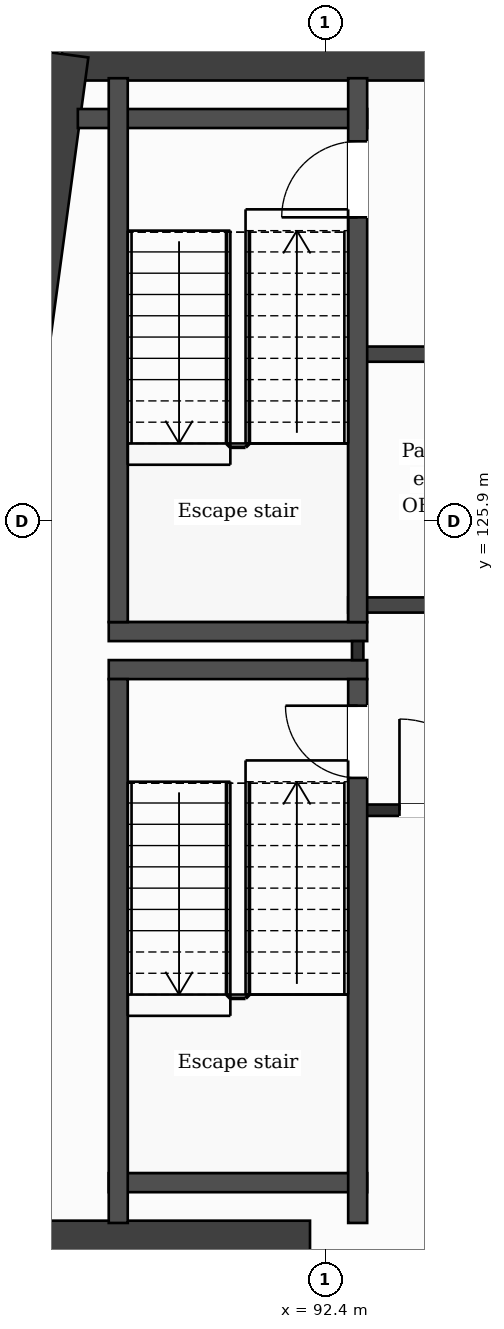
"""IFC4 building model, lengths in metres.
Left out: names, types, materials, properties, quantities, classifications, styles, units other than length and angle.
Written with IfcOpenShell. Run it as: python <this file> out.ifc"""

import sys

from ifc_helpers import new_model, si_unit, direction, frame, frame_2d, origin, place, context, subcontext, project, spatial, rectangle, extrude, element, fill, save


model = new_model("IFC4")
c1 = context("Model", 3, precision=1e-05, world=origin(), true_north=direction((0.0, 1.0)))
c2 = subcontext(c1, "Body", "Model", "MODEL_VIEW")
j1 = project(units=[si_unit("LENGTHUNIT", "METRE"), si_unit("PLANEANGLEUNIT", "RADIAN")], contexts=[c1])
p1 = place(None, origin())
s1 = spatial("IfcSite", under=j1, at=p1, CompositionType="ELEMENT")
p2 = place(p1, origin())
s2 = spatial("IfcBuilding", under=s1, at=p2, CompositionType="ELEMENT")
p3 = place(p2, frame((0.0, 0.0, 273.8)))
s3 = spatial("IfcBuildingStorey", under=s2, at=p3, CompositionType="ELEMENT", Elevation=273.8)
p4 = place(p3, frame((88.937, 132.05, 0.0), z_axis=(0.0, 0.0, 1.0), x_axis=(1.0, 0.0, 0.0)))
e1 = element("IfcWall", 1, at=p4, inside=s3, PredefinedType="SHEAR", context=c2, shape_type="SweptSolid", body=[
    extrude(rectangle(XDim=11.513, YDim=0.7, at=frame_2d((5.757, 0.0))), origin(), (0.0, 0.0, 1.0), 3.7),
])
p5 = place(p4, frame((6.927, 0.0, 0.0)))
e2 = element("IfcOpeningElement", 2, at=p5, cuts=e1, PredefinedType="OPENING", context=c2, shape_type="SweptSolid", body=[
    extrude(rectangle(XDim=1.2, YDim=2.1, at=frame_2d((0.6, 1.05))), frame((0.0, 0.36, 0.0), z_axis=(0.0, -1.0, 0.0), x_axis=(1.0, 0.0, 0.0)), (0.0, 0.0, 1.0), 0.72),
])
p6 = place(p3, frame((86.07, 110.75, 0.0), z_axis=(0.0, 0.0, 1.0), x_axis=(0.133406218907, 0.991061441464, 0.0)))
e3 = element("IfcWall", 3, at=p6, inside=s3, PredefinedType="SHEAR", context=c2, shape_type="SweptSolid", body=[
    extrude(rectangle(XDim=21.492, YDim=0.7, at=frame_2d((10.746, 0.0))), origin(), (0.0, 0.0, 1.0), 3.7),
])
p7 = place(p3, frame((87.123, 116.35, 0.0), z_axis=(0.0, 0.0, 1.0), x_axis=(1.0, 0.0, 0.0)))
e4 = element("IfcWall", 4, at=p7, inside=s3, PredefinedType="SHEAR", context=c2, shape_type="SweptSolid", body=[
    extrude(rectangle(XDim=5.077, YDim=0.7, at=frame_2d((2.539, 0.0))), origin(), (0.0, 0.0, 1.0), 3.7),
])
p8 = place(p3, frame((89.552, 117.2, 0.0), z_axis=(0.0, 0.0, 1.0), x_axis=(1.0, 0.0, 0.0)))
e5 = element("IfcWall", 5, at=p8, inside=s3, PredefinedType="PARTITIONING", context=c2, shape_type="SweptSolid", body=[
    extrude(rectangle(XDim=3.4, YDim=0.25, at=frame_2d((1.7, 0.0))), origin(), (0.0, 0.0, 1.0), 3.38),
])
p9 = place(p3, frame((92.827, 122.1, 0.0), z_axis=(0.0, 0.0, 1.0), x_axis=(1.0, 0.0, 0.0)))
e6 = element("IfcWall", 6, at=p9, inside=s3, PredefinedType="PARTITIONING", context=c2, shape_type="SweptSolid", body=[
    extrude(rectangle(XDim=2.4, YDim=0.15, at=frame_2d((1.2, 0.0))), origin(), (0.0, 0.0, 1.0), 3.38),
])
p10 = place(p9, frame((0.55, 0.0, 0.0)))
e7 = element("IfcOpeningElement", 7, at=p10, cuts=e6, PredefinedType="OPENING", context=c2, shape_type="SweptSolid", body=[
    extrude(rectangle(XDim=1.2, YDim=2.1, at=frame_2d((0.6, 1.05))), frame((0.0, 0.085, 0.0), z_axis=(0.0, -1.0, 0.0), x_axis=(1.0, 0.0, 0.0)), (0.0, 0.0, 1.0), 0.17),
])
for number, where, z_axis, x_axis in (
    (8, (89.552, 123.95, 0.0), (0.0, 0.0, 1.0), (1.0, 0.0, 0.0)),
    (9, (89.552, 124.45, 0.0), (0.0, 0.0, 1.0), (1.0, 0.0, 0.0)),
):
    element("IfcWall", number, at=place(p3, frame(where, z_axis=z_axis, x_axis=x_axis)), inside=s3, PredefinedType="PARTITIONING", context=c2, shape_type="SweptSolid", body=[
        extrude(rectangle(XDim=3.4, YDim=0.25, at=frame_2d((1.7, 0.0))), origin(), (0.0, 0.0, 1.0), 3.38),
    ])
p11 = place(p3, frame((92.702, 124.8, 0.0), z_axis=(0.0, 0.0, 1.0), x_axis=(1.0, 0.0, 0.0)))
e10 = element("IfcWall", 10, at=p11, inside=s3, PredefinedType="PARTITIONING", context=c2, shape_type="SweptSolid", body=[
    extrude(rectangle(XDim=7.398, YDim=0.2, at=frame_2d((3.699, 0.0))), origin(), (0.0, 0.0, 1.0), 3.38),
])
p12 = place(p11, frame((5.636, 0.0, 0.0)))
e11 = element("IfcOpeningElement", 11, at=p12, cuts=e10, PredefinedType="OPENING", context=c2, shape_type="SweptSolid", body=[
    extrude(rectangle(XDim=1.1, YDim=2.1, at=frame_2d((0.55, 1.05))), frame((0.0, 0.11, 0.0), z_axis=(0.0, -1.0, 0.0), x_axis=(1.0, 0.0, 0.0)), (0.0, 0.0, 1.0), 0.22),
])
p13 = place(p3, frame((92.827, 128.1, 0.0), z_axis=(0.0, 0.0, 1.0), x_axis=(1.0, 0.0, 0.0)))
e12 = element("IfcWall", 12, at=p13, inside=s3, PredefinedType="PARTITIONING", context=c2, shape_type="SweptSolid", body=[
    extrude(rectangle(XDim=7.273, YDim=0.2, at=frame_2d((3.637, 0.0))), origin(), (0.0, 0.0, 1.0), 3.38),
])
p14 = place(p13, frame((2.93, 0.0, 0.0)))
e13 = element("IfcOpeningElement", 13, at=p14, cuts=e12, PredefinedType="OPENING", context=c2, shape_type="SweptSolid", body=[
    extrude(rectangle(XDim=1.1, YDim=2.1, at=frame_2d((0.55, 1.05))), frame((0.0, 0.11, 0.0), z_axis=(0.0, -1.0, 0.0), x_axis=(1.0, 0.0, 0.0)), (0.0, 0.0, 1.0), 0.22),
])
p15 = place(p3, frame((89.146, 131.2, 0.0), z_axis=(0.0, 0.0, 1.0), x_axis=(1.0, 0.0, 0.0)))
e14 = element("IfcWall", 14, at=p15, inside=s3, PredefinedType="PARTITIONING", context=c2, shape_type="SweptSolid", body=[
    extrude(rectangle(XDim=3.806, YDim=0.25, at=frame_2d((1.903, 0.0))), origin(), (0.0, 0.0, 1.0), 3.38),
])
for number, where, z_axis, x_axis in (
    (15, (89.677, 116.67, 0.0), (0.0, 0.0, 1.0), (0.0, 1.0, 0.0)),
    (16, (89.677, 124.575, 0.0), (0.0, 0.0, 1.0), (0.0, 1.0, 0.0)),
):
    element("IfcWall", number, at=place(p3, frame(where, z_axis=z_axis, x_axis=x_axis)), inside=s3, PredefinedType="PARTITIONING", context=c2, shape_type="SweptSolid", body=[
        extrude(rectangle(XDim=7.155, YDim=0.25, at=frame_2d((3.578, 0.0))), origin(), (0.0, 0.0, 1.0), 3.38),
    ])
p16 = place(p3, frame((92.827, 124.075, 0.0), z_axis=(0.0, 0.0, 1.0), x_axis=(0.0, 1.0, 0.0)))
e17 = element("IfcWall", 17, at=p16, inside=s3, PredefinedType="PARTITIONING", context=c2, shape_type="SweptSolid", body=[
    extrude(rectangle(XDim=0.25, YDim=0.15, at=frame_2d((0.125, 0.0))), origin(), (0.0, 0.0, 1.0), 3.38),
])
p17 = place(p3, frame((92.827, 116.67, 0.0), z_axis=(0.0, 0.0, 1.0), x_axis=(0.0, 1.0, 0.0)))
e18 = element("IfcWall", 18, at=p17, inside=s3, PredefinedType="PARTITIONING", context=c2, shape_type="SweptSolid", body=[
    extrude(rectangle(XDim=7.155, YDim=0.25, at=frame_2d((3.578, 0.0))), origin(), (0.0, 0.0, 1.0), 3.38),
])
p18 = place(p17, frame((5.855, 0.0, 0.0)))
e19 = element("IfcOpeningElement", 19, at=p18, cuts=e18, PredefinedType="OPENING", context=c2, shape_type="SweptSolid", body=[
    extrude(rectangle(XDim=0.95, YDim=2.1, at=frame_2d((0.475, 1.05))), frame((0.0, 0.135, 0.0), z_axis=(0.0, -1.0, 0.0), x_axis=(1.0, 0.0, 0.0)), (0.0, 0.0, 1.0), 0.27),
])
p19 = place(p3, frame((92.827, 124.575, 0.0), z_axis=(0.0, 0.0, 1.0), x_axis=(0.0, 1.0, 0.0)))
e20 = element("IfcWall", 20, at=p19, inside=s3, PredefinedType="PARTITIONING", context=c2, shape_type="SweptSolid", body=[
    extrude(rectangle(XDim=7.155, YDim=0.25, at=frame_2d((3.578, 0.0))), origin(), (0.0, 0.0, 1.0), 3.38),
])
p20 = place(p19, frame((5.325, 0.0, 0.0)))
e21 = element("IfcOpeningElement", 21, at=p20, cuts=e20, PredefinedType="OPENING", context=c2, shape_type="SweptSolid", body=[
    extrude(rectangle(XDim=1.0, YDim=2.1, at=frame_2d((0.5, 1.05))), frame((0.0, 0.135, 0.0), z_axis=(0.0, -1.0, 0.0), x_axis=(1.0, 0.0, 0.0)), (0.0, 0.0, 1.0), 0.27),
])
p21 = place(p10, origin())
e22 = element("IfcDoor", 22, at=p21, inside=s3, OperationType="SINGLE_SWING_LEFT", PredefinedType="DOOR", context=c2, shape_type="SweptSolid", body=[
    extrude(rectangle(XDim=1.2, YDim=2.1, at=frame_2d((0.6, 1.05))), frame((0.0, 0.025, 0.0), z_axis=(0.0, -1.0, 0.0), x_axis=(1.0, 0.0, 0.0)), (0.0, 0.0, 1.0), 0.05),
])
fill(e7, e22)
p22 = place(p18, origin())
e23 = element("IfcDoor", 23, at=p22, inside=s3, OperationType="SINGLE_SWING_RIGHT", PredefinedType="DOOR", context=c2, shape_type="SweptSolid", body=[
    extrude(rectangle(XDim=0.95, YDim=2.1, at=frame_2d((0.475, 1.05))), frame((0.0, 0.025, 0.0), z_axis=(0.0, -1.0, 0.0), x_axis=(1.0, 0.0, 0.0)), (0.0, 0.0, 1.0), 0.05),
])
fill(e19, e23)
p23 = place(p20, origin())
e24 = element("IfcDoor", 24, at=p23, inside=s3, OperationType="SINGLE_SWING_LEFT", PredefinedType="DOOR", context=c2, shape_type="SweptSolid", body=[
    extrude(rectangle(XDim=1.0, YDim=2.1, at=frame_2d((0.5, 1.05))), frame((0.0, 0.025, 0.0), z_axis=(0.0, -1.0, 0.0), x_axis=(1.0, 0.0, 0.0)), (0.0, 0.0, 1.0), 0.05),
])
fill(e21, e24)
save(model, sys.argv[1])
